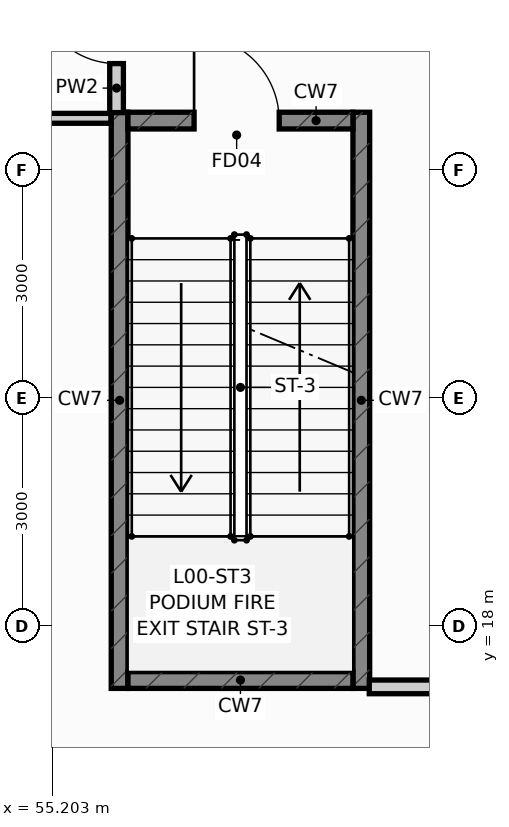
"""IFC4 building model, lengths in metres.
Left out: names, types, materials, properties, quantities, classifications, styles, units other than length and angle.
Written with IfcOpenShell. Run it as: python <this file> out.ifc"""

import sys

from ifc_helpers import new_model, si_unit, direction, frame, frame_2d, origin, place, context, subcontext, project, spatial, rectangle, extrude, element, fill, save


model = new_model("IFC4")
c1 = context("Model", 3, precision=1e-05, world=origin(), true_north=direction((0.0, 1.0)))
c2 = subcontext(c1, "Body", "Model", "MODEL_VIEW")
j1 = project(units=[si_unit("LENGTHUNIT", "METRE"), si_unit("PLANEANGLEUNIT", "RADIAN")], contexts=[c1])
p1 = place(None, origin())
s1 = spatial("IfcSite", under=j1, at=p1, CompositionType="ELEMENT")
p2 = place(p1, origin())
s2 = spatial("IfcBuilding", under=s1, at=p2, CompositionType="ELEMENT")
p3 = place(p2, origin())
s3 = spatial("IfcBuildingStorey", under=s2, at=p3, CompositionType="ELEMENT", Elevation=0.0)
for number, where, z_axis, x_axis in (
    (1, (56.09, 17.18, 0.0), (0.0, 0.0, 1.0), (0.0, 1.0, 0.0)),
    (2, (59.27, 17.18, 0.0), (0.0, 0.0, 1.0), (0.0, 1.0, 0.0)),
):
    element("IfcWall", number, at=place(p3, frame(where, z_axis=z_axis, x_axis=x_axis)), inside=s3, PredefinedType="SHEAR", context=c2, shape_type="SweptSolid", body=[
        extrude(rectangle(XDim=7.58, YDim=0.22, at=frame_2d((3.79, 0.0))), origin(), (0.0, 0.0, 1.0), 5.4),
    ])
p4 = place(p3, frame((56.2, 17.29, 0.0), z_axis=(0.0, 0.0, 1.0), x_axis=(1.0, 0.0, 0.0)))
e3 = element("IfcWall", 3, at=p4, inside=s3, PredefinedType="SHEAR", context=c2, shape_type="SweptSolid", body=[
    extrude(rectangle(XDim=2.96, YDim=0.22, at=frame_2d((1.48, 0.0))), origin(), (0.0, 0.0, 1.0), 5.4),
])
p5 = place(p3, frame((56.2, 24.65, 0.0), z_axis=(0.0, 0.0, 1.0), x_axis=(1.0, 0.0, 0.0)))
e4 = element("IfcWall", 4, at=p5, inside=s3, PredefinedType="SHEAR", context=c2, shape_type="SweptSolid", body=[
    extrude(rectangle(XDim=2.96, YDim=0.22, at=frame_2d((1.48, 0.0))), origin(), (0.0, 0.0, 1.0), 5.4),
])
p6 = place(p5, frame((0.87, 0.0, 0.0)))
e5 = element("IfcOpeningElement", 5, at=p6, cuts=e4, PredefinedType="OPENING", context=c2, shape_type="SweptSolid", body=[
    extrude(rectangle(XDim=1.12, YDim=2.15, at=frame_2d((0.56, 1.075))), frame((0.0, 0.122, 0.0), z_axis=(0.0, -1.0, 0.0), x_axis=(1.0, 0.0, 0.0)), (0.0, 0.0, 1.0), 0.244),
])
p7 = place(p3, frame((65.595, 17.2, 0.0), z_axis=(0.0, 0.0, 1.0), x_axis=(-1.0, 0.0, 0.0)))
e6 = element("IfcWall", 6, at=p7, inside=s3, PredefinedType="PARTITIONING", context=c2, shape_type="SweptSolid", body=[
    extrude(rectangle(XDim=6.22, YDim=0.18, at=frame_2d((3.11, 0.0))), origin(), (0.0, 0.0, 1.0), 5.08),
])
p8 = place(p3, frame((56.05, 24.755, 0.0), z_axis=(0.0, 0.0, 1.0), x_axis=(0.0, 1.0, 0.0)))
e7 = element("IfcWall", 7, at=p8, inside=s3, PredefinedType="PARTITIONING", context=c2, shape_type="SweptSolid", body=[
    extrude(rectangle(XDim=2.34, YDim=0.18, at=frame_2d((1.17, 0.0))), origin(), (0.0, 0.0, 1.0), 5.08),
])
p9 = place(p8, frame((0.645, 0.0, 0.0)))
e8 = element("IfcOpeningElement", 8, at=p9, cuts=e7, PredefinedType="OPENING", context=c2, shape_type="SweptSolid", body=[
    extrude(rectangle(XDim=1.05, YDim=2.15, at=frame_2d((0.525, 1.075))), frame((0.0, 0.102, 0.0), z_axis=(0.0, -1.0, 0.0), x_axis=(1.0, 0.0, 0.0)), (0.0, 0.0, 1.0), 0.204),
])
p10 = place(p3, frame((51.205, 24.68, 0.0), z_axis=(0.0, 0.0, 1.0), x_axis=(1.0, 0.0, 0.0)))
e9 = element("IfcWall", 9, at=p10, inside=s3, PredefinedType="PARTITIONING", context=c2, shape_type="SweptSolid", body=[
    extrude(rectangle(XDim=4.77, YDim=0.13, at=frame_2d((2.385, 0.0))), origin(), (0.0, 0.0, 1.0), 5.08),
])
p11 = place(p6, origin())
e10 = element("IfcDoor", 10, at=p11, inside=s3, OperationType="SINGLE_SWING_LEFT", PredefinedType="DOOR", context=c2, shape_type="SweptSolid", body=[
    extrude(rectangle(XDim=1.12, YDim=2.15, at=frame_2d((0.56, 1.075))), frame((0.0, 0.025, 0.0), z_axis=(0.0, -1.0, 0.0), x_axis=(1.0, 0.0, 0.0)), (0.0, 0.0, 1.0), 0.05),
])
fill(e5, e10)
p12 = place(p9, origin())
e11 = element("IfcDoor", 11, at=p12, inside=s3, OperationType="SINGLE_SWING_RIGHT", PredefinedType="DOOR", context=c2, shape_type="SweptSolid", body=[
    extrude(rectangle(XDim=1.05, YDim=2.15, at=frame_2d((0.525, 1.075))), frame((0.0, 0.025, 0.0), z_axis=(0.0, -1.0, 0.0), x_axis=(1.0, 0.0, 0.0)), (0.0, 0.0, 1.0), 0.05),
])
fill(e8, e11)
save(model, sys.argv[1])
